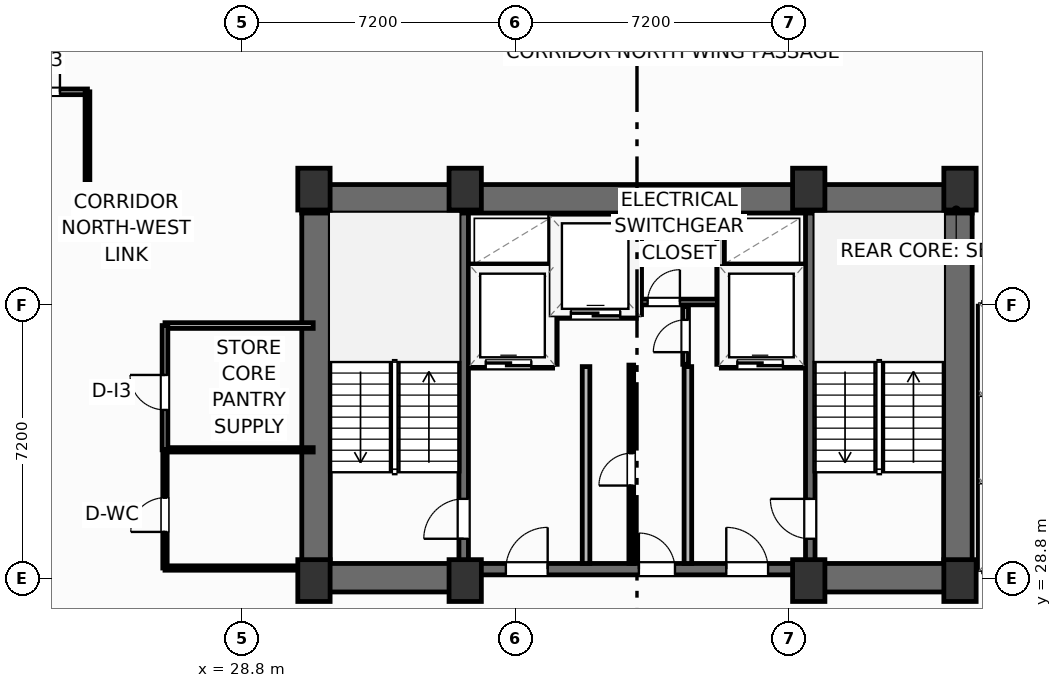
"""IFC4 building model, lengths in metres.
Left out: names, types, materials, properties, quantities, classifications, styles, units other than length and angle.
Written with IfcOpenShell. Run it as: python <this file> out.ifc"""

import sys

from ifc_helpers import new_model, si_unit, direction, frame, frame_2d, origin, origin_2d, place, context, subcontext, project, spatial, rectangle, extrude, element, fill, save


model = new_model("IFC4")
c1 = context("Model", 3, precision=1e-05, world=origin(), true_north=direction((0.0, 1.0)))
c2 = subcontext(c1, "Body", "Model", "MODEL_VIEW")
j1 = project(units=[si_unit("LENGTHUNIT", "METRE"), si_unit("PLANEANGLEUNIT", "RADIAN")], contexts=[c1])
p1 = place(None, origin())
s1 = spatial("IfcSite", under=j1, at=p1, CompositionType="ELEMENT")
p2 = place(p1, origin())
s2 = spatial("IfcBuilding", under=s1, at=p2, CompositionType="ELEMENT")
p3 = place(p2, frame((0.0, 0.0, 143.9)))
s3 = spatial("IfcBuildingStorey", under=s2, at=p3, CompositionType="ELEMENT", Elevation=143.9)
for number, where, z_axis, x_axis in (
    (1, (30.7, 28.75, 0.0), (0.0, 0.0, 1.0), (1.0, 0.0, 0.0)),
    (2, (34.68, 28.75, 0.0), (0.0, 0.0, 1.0), (1.0, 0.0, 0.0)),
    (3, (43.72, 28.75, 0.0), (0.0, 0.0, 1.0), (1.0, 0.0, 0.0)),
    (4, (47.7, 28.75, 0.0), (0.0, 0.0, 1.0), (1.0, 0.0, 0.0)),
    (5, (30.7, 39.05, 0.0), (0.0, 0.0, 1.0), (1.0, 0.0, 0.0)),
    (6, (34.68, 39.05, 0.0), (0.0, 0.0, 1.0), (1.0, 0.0, 0.0)),
    (7, (43.72, 39.05, 0.0), (0.0, 0.0, 1.0), (1.0, 0.0, 0.0)),
    (8, (47.7, 39.05, 0.0), (0.0, 0.0, 1.0), (1.0, 0.0, 0.0)),
):
    element("IfcColumn", number, at=place(p3, frame(where, z_axis=z_axis, x_axis=x_axis)), inside=s3, PredefinedType="COLUMN", context=c2, shape_type="SweptSolid", body=[
        extrude(rectangle(XDim=0.85, YDim=1.1, at=origin_2d()), origin(), (0.0, 0.0, 1.0), 3.7),
    ])
p4 = place(p3, frame((30.38, 38.795, 0.0), z_axis=(0.0, 0.0, 1.0), x_axis=(1.0, 0.0, 0.0)))
e9 = element("IfcWall", 9, at=p4, inside=s3, PredefinedType="SHEAR", context=c2, shape_type="SweptSolid", body=[
    extrude(rectangle(XDim=17.64, YDim=0.75, at=frame_2d((8.82, 0.0))), origin(), (0.0, 0.0, 1.0), 3.45),
])
for number, where, z_axis, x_axis in (
    (10, (30.755, 29.2, 0.0), (0.0, 0.0, 1.0), (0.0, 1.0, 0.0)),
    (11, (47.645, 29.2, 0.0), (0.0, 0.0, 1.0), (0.0, 1.0, 0.0)),
):
    element("IfcWall", number, at=place(p3, frame(where, z_axis=z_axis, x_axis=x_axis)), inside=s3, PredefinedType="SHEAR", context=c2, shape_type="SweptSolid", body=[
        extrude(rectangle(XDim=9.22, YDim=0.75, at=frame_2d((4.61, 0.0))), origin(), (0.0, 0.0, 1.0), 3.45),
    ])
p5 = place(p3, frame((30.38, 28.825, 0.0), z_axis=(0.0, 0.0, 1.0), x_axis=(1.0, 0.0, 0.0)))
e12 = element("IfcWall", 12, at=p5, inside=s3, PredefinedType="SHEAR", context=c2, shape_type="SweptSolid", body=[
    extrude(rectangle(XDim=4.42, YDim=0.75, at=frame_2d((2.21, 0.0))), origin(), (0.0, 0.0, 1.0), 3.45),
])
p6 = place(p3, frame((43.6, 28.825, 0.0), z_axis=(0.0, 0.0, 1.0), x_axis=(1.0, 0.0, 0.0)))
e13 = element("IfcWall", 13, at=p6, inside=s3, PredefinedType="SHEAR", context=c2, shape_type="SweptSolid", body=[
    extrude(rectangle(XDim=4.42, YDim=0.75, at=frame_2d((2.21, 0.0))), origin(), (0.0, 0.0, 1.0), 3.45),
])
p7 = place(p3, frame((34.8, 29.05, 0.0), z_axis=(0.0, 0.0, 1.0), x_axis=(1.0, 0.0, 0.0)))
e14 = element("IfcWall", 14, at=p7, inside=s3, PredefinedType="SHEAR", context=c2, shape_type="SweptSolid", body=[
    extrude(rectangle(XDim=8.8, YDim=0.3, at=frame_2d((4.4, 0.0))), origin(), (0.0, 0.0, 1.0), 3.45),
])
p8 = place(p7, frame((0.95, 0.0, 0.0)))
e15 = element("IfcOpeningElement", 15, at=p8, cuts=e14, PredefinedType="OPENING", context=c2, shape_type="SweptSolid", body=[
    extrude(rectangle(XDim=1.1, YDim=2.15, at=frame_2d((0.55, 1.075))), frame((0.0, 0.16, 0.0), z_axis=(0.0, -1.0, 0.0), x_axis=(1.0, 0.0, 0.0)), (0.0, 0.0, 1.0), 0.32),
])
p9 = place(p7, frame((6.75, 0.0, 0.0)))
e16 = element("IfcOpeningElement", 16, at=p9, cuts=e14, PredefinedType="OPENING", context=c2, shape_type="SweptSolid", body=[
    extrude(rectangle(XDim=1.1, YDim=2.15, at=frame_2d((0.55, 1.075))), frame((0.0, 0.16, 0.0), z_axis=(0.0, -1.0, 0.0), x_axis=(1.0, 0.0, 0.0)), (0.0, 0.0, 1.0), 0.32),
])
p10 = place(p7, frame((4.45, 0.0, 0.0)))
e17 = element("IfcOpeningElement", 17, at=p10, cuts=e14, PredefinedType="OPENING", context=c2, shape_type="SweptSolid", body=[
    extrude(rectangle(XDim=0.95, YDim=2.15, at=frame_2d((0.475, 1.075))), frame((0.0, 0.16, 0.0), z_axis=(0.0, -1.0, 0.0), x_axis=(1.0, 0.0, 0.0)), (0.0, 0.0, 1.0), 0.32),
])
p11 = place(p3, frame((34.64, 29.2, 0.0), z_axis=(0.0, 0.0, 1.0), x_axis=(0.0, 1.0, 0.0)))
e18 = element("IfcWall", 18, at=p11, inside=s3, PredefinedType="SHEAR", context=c2, shape_type="SweptSolid", body=[
    extrude(rectangle(XDim=9.22, YDim=0.25, at=frame_2d((4.61, 0.0))), origin(), (0.0, 0.0, 1.0), 3.45),
])
p12 = place(p11, frame((0.65, 0.0, 0.0)))
e19 = element("IfcOpeningElement", 19, at=p12, cuts=e18, PredefinedType="OPENING", context=c2, shape_type="SweptSolid", body=[
    extrude(rectangle(XDim=1.05, YDim=2.15, at=frame_2d((0.525, 1.075))), frame((0.0, 0.135, 0.0), z_axis=(0.0, -1.0, 0.0), x_axis=(1.0, 0.0, 0.0)), (0.0, 0.0, 1.0), 0.27),
])
p13 = place(p3, frame((43.76, 29.2, 0.0), z_axis=(0.0, 0.0, 1.0), x_axis=(0.0, 1.0, 0.0)))
e20 = element("IfcWall", 20, at=p13, inside=s3, PredefinedType="SHEAR", context=c2, shape_type="SweptSolid", body=[
    extrude(rectangle(XDim=9.22, YDim=0.25, at=frame_2d((4.61, 0.0))), origin(), (0.0, 0.0, 1.0), 3.45),
])
p14 = place(p13, frame((0.65, 0.0, 0.0)))
e21 = element("IfcOpeningElement", 21, at=p14, cuts=e20, PredefinedType="OPENING", context=c2, shape_type="SweptSolid", body=[
    extrude(rectangle(XDim=1.05, YDim=2.15, at=frame_2d((0.525, 1.075))), frame((0.0, 0.135, 0.0), z_axis=(0.0, -1.0, 0.0), x_axis=(1.0, 0.0, 0.0)), (0.0, 0.0, 1.0), 0.27),
])
p15 = place(p3, frame((5.0, 41.61, 0.0), z_axis=(0.0, 0.0, 1.0), x_axis=(1.0, 0.0, 0.0)))
e22 = element("IfcWall", 22, at=p15, inside=s3, PredefinedType="PARTITIONING", context=c2, shape_type="SweptSolid", body=[
    extrude(rectangle(XDim=19.74, YDim=0.15, at=frame_2d((9.87, 0.0))), origin(), (0.0, 0.0, 1.0), 3.45),
])
p16 = place(p15, frame((18.096, 0.0, 0.0)))
e23 = element("IfcOpeningElement", 23, at=p16, cuts=e22, PredefinedType="OPENING", context=c2, shape_type="SweptSolid", body=[
    extrude(rectangle(XDim=0.92, YDim=2.05, at=frame_2d((0.46, 1.025))), frame((0.0, 0.085, 0.0), z_axis=(0.0, -1.0, 0.0), x_axis=(1.0, 0.0, 0.0)), (0.0, 0.0, 1.0), 0.17),
])
p17 = place(p3, frame((24.74, 39.3, 0.0), z_axis=(0.0, 0.0, 1.0), x_axis=(0.0, 1.0, 0.0)))
e24 = element("IfcWall", 24, at=p17, inside=s3, PredefinedType="PARTITIONING", context=c2, shape_type="SweptSolid", body=[
    extrude(rectangle(XDim=2.31, YDim=0.125, at=frame_2d((1.155, 0.0))), origin(), (0.0, 0.0, 1.0), 3.45),
])
for number, where, z_axis, x_axis in (
    (25, (37.86, 29.2, 0.0), (0.0, 0.0, 1.0), (0.0, 1.0, 0.0)),
    (26, (40.54, 29.2, 0.0), (0.0, 0.0, 1.0), (0.0, 1.0, 0.0)),
):
    element("IfcWall", number, at=place(p3, frame(where, z_axis=z_axis, x_axis=x_axis)), inside=s3, PredefinedType="PARTITIONING", context=c2, shape_type="SweptSolid", body=[
        extrude(rectangle(XDim=5.18, YDim=0.2, at=frame_2d((2.59, 0.0))), origin(), (0.0, 0.0, 1.0), 3.45),
    ])
p18 = place(p3, frame((34.8, 34.44, 0.0), z_axis=(0.0, 0.0, 1.0), x_axis=(1.0, 0.0, 0.0)))
e27 = element("IfcWall", 27, at=p18, inside=s3, PredefinedType="PARTITIONING", context=c2, shape_type="SweptSolid", body=[
    extrude(rectangle(XDim=2.18, YDim=0.2, at=frame_2d((1.09, 0.0))), origin(), (0.0, 0.0, 1.0), 3.45),
])
p19 = place(p18, frame((0.42, 0.0, 0.0)))
e28 = element("IfcOpeningElement", 28, at=p19, cuts=e27, PredefinedType="OPENING", context=c2, shape_type="SweptSolid", body=[
    extrude(rectangle(XDim=1.2, YDim=2.2, at=frame_2d((0.6, 1.1))), frame((0.0, 0.11, 0.0), z_axis=(0.0, -1.0, 0.0), x_axis=(1.0, 0.0, 0.0)), (0.0, 0.0, 1.0), 0.22),
])
p20 = place(p3, frame((34.8, 36.98, 0.0), z_axis=(0.0, 0.0, 1.0), x_axis=(1.0, 0.0, 0.0)))
e29 = element("IfcWall", 29, at=p20, inside=s3, PredefinedType="PARTITIONING", context=c2, shape_type="SweptSolid", body=[
    extrude(rectangle(XDim=2.18, YDim=0.2, at=frame_2d((1.09, 0.0))), origin(), (0.0, 0.0, 1.0), 3.45),
])
p21 = place(p3, frame((37.0, 34.44, 0.0), z_axis=(0.0, 0.0, 1.0), x_axis=(0.0, 1.0, 0.0)))
e30 = element("IfcWall", 30, at=p21, inside=s3, PredefinedType="PARTITIONING", context=c2, shape_type="SweptSolid", body=[
    extrude(rectangle(XDim=3.9, YDim=0.2, at=frame_2d((1.95, 0.0))), origin(), (0.0, 0.0, 1.0), 3.45),
])
p22 = place(p3, frame((41.42, 34.44, 0.0), z_axis=(0.0, 0.0, 1.0), x_axis=(1.0, 0.0, 0.0)))
e31 = element("IfcWall", 31, at=p22, inside=s3, PredefinedType="PARTITIONING", context=c2, shape_type="SweptSolid", body=[
    extrude(rectangle(XDim=2.18, YDim=0.2, at=frame_2d((1.09, 0.0))), origin(), (0.0, 0.0, 1.0), 3.45),
])
p23 = place(p22, frame((0.42, 0.0, 0.0)))
e32 = element("IfcOpeningElement", 32, at=p23, cuts=e31, PredefinedType="OPENING", context=c2, shape_type="SweptSolid", body=[
    extrude(rectangle(XDim=1.2, YDim=2.2, at=frame_2d((0.6, 1.1))), frame((0.0, 0.11, 0.0), z_axis=(0.0, -1.0, 0.0), x_axis=(1.0, 0.0, 0.0)), (0.0, 0.0, 1.0), 0.22),
])
p24 = place(p3, frame((41.42, 36.98, 0.0), z_axis=(0.0, 0.0, 1.0), x_axis=(1.0, 0.0, 0.0)))
e33 = element("IfcWall", 33, at=p24, inside=s3, PredefinedType="PARTITIONING", context=c2, shape_type="SweptSolid", body=[
    extrude(rectangle(XDim=2.18, YDim=0.2, at=frame_2d((1.09, 0.0))), origin(), (0.0, 0.0, 1.0), 3.45),
])
p25 = place(p3, frame((41.4, 34.44, 0.0), z_axis=(0.0, 0.0, 1.0), x_axis=(0.0, 1.0, 0.0)))
e34 = element("IfcWall", 34, at=p25, inside=s3, PredefinedType="PARTITIONING", context=c2, shape_type="SweptSolid", body=[
    extrude(rectangle(XDim=3.9, YDim=0.2, at=frame_2d((1.95, 0.0))), origin(), (0.0, 0.0, 1.0), 3.45),
])
p26 = place(p3, frame((37.06, 35.75, 0.0), z_axis=(0.0, 0.0, 1.0), x_axis=(1.0, 0.0, 0.0)))
e35 = element("IfcWall", 35, at=p26, inside=s3, PredefinedType="PARTITIONING", context=c2, shape_type="SweptSolid", body=[
    extrude(rectangle(XDim=2.12, YDim=0.2, at=frame_2d((1.06, 0.0))), origin(), (0.0, 0.0, 1.0), 3.45),
])
p27 = place(p26, frame((0.4, 0.0, 0.0)))
e36 = element("IfcOpeningElement", 36, at=p27, cuts=e35, PredefinedType="OPENING", context=c2, shape_type="SweptSolid", body=[
    extrude(rectangle(XDim=1.3, YDim=2.2, at=frame_2d((0.65, 1.1))), frame((0.0, 0.11, 0.0), z_axis=(0.0, -1.0, 0.0), x_axis=(1.0, 0.0, 0.0)), (0.0, 0.0, 1.0), 0.22),
])
p28 = place(p3, frame((39.22, 35.75, 0.0), z_axis=(0.0, 0.0, 1.0), x_axis=(0.0, 1.0, 0.0)))
e37 = element("IfcWall", 37, at=p28, inside=s3, PredefinedType="PARTITIONING", context=c2, shape_type="SweptSolid", body=[
    extrude(rectangle(XDim=2.59, YDim=0.2, at=frame_2d((1.295, 0.0))), origin(), (0.0, 0.0, 1.0), 3.45),
])
p29 = place(p3, frame((39.3, 36.08, 0.0), z_axis=(0.0, 0.0, 1.0), x_axis=(1.0, 0.0, 0.0)))
e38 = element("IfcWall", 38, at=p29, inside=s3, PredefinedType="PARTITIONING", context=c2, shape_type="SweptSolid", body=[
    extrude(rectangle(XDim=2.02, YDim=0.15, at=frame_2d((1.01, 0.0))), origin(), (0.0, 0.0, 1.0), 3.45),
])
p30 = place(p29, frame((0.18, 0.0, 0.0)))
e39 = element("IfcOpeningElement", 39, at=p30, cuts=e38, PredefinedType="OPENING", context=c2, shape_type="SweptSolid", body=[
    extrude(rectangle(XDim=0.85, YDim=2.05, at=frame_2d((0.425, 1.025))), frame((0.0, 0.085, 0.0), z_axis=(0.0, -1.0, 0.0), x_axis=(1.0, 0.0, 0.0)), (0.0, 0.0, 1.0), 0.17),
])
p31 = place(p3, frame((40.48, 34.44, 0.0), z_axis=(0.0, 0.0, 1.0), x_axis=(0.0, 1.0, 0.0)))
e40 = element("IfcWall", 40, at=p31, inside=s3, PredefinedType="PARTITIONING", context=c2, shape_type="SweptSolid", body=[
    extrude(rectangle(XDim=1.52, YDim=0.15, at=frame_2d((0.76, 0.0))), origin(), (0.0, 0.0, 1.0), 3.45),
])
p32 = place(p31, frame((0.32, 0.0, 0.0)))
e41 = element("IfcOpeningElement", 41, at=p32, cuts=e40, PredefinedType="OPENING", context=c2, shape_type="SweptSolid", body=[
    extrude(rectangle(XDim=0.85, YDim=2.05, at=frame_2d((0.425, 1.025))), frame((0.0, 0.085, 0.0), z_axis=(0.0, -1.0, 0.0), x_axis=(1.0, 0.0, 0.0)), (0.0, 0.0, 1.0), 0.17),
])
p33 = place(p3, frame((39.05, 29.2, 0.0), z_axis=(0.0, 0.0, 1.0), x_axis=(0.0, 1.0, 0.0)))
e42 = element("IfcWall", 42, at=p33, inside=s3, PredefinedType="PARTITIONING", context=c2, shape_type="SweptSolid", body=[
    extrude(rectangle(XDim=5.22, YDim=0.125, at=frame_2d((2.61, 0.0))), origin(), (0.0, 0.0, 1.0), 3.45),
])
p34 = place(p33, frame((2.05, 0.0, 0.0)))
e43 = element("IfcOpeningElement", 43, at=p34, cuts=e42, PredefinedType="OPENING", context=c2, shape_type="SweptSolid", body=[
    extrude(rectangle(XDim=0.85, YDim=2.05, at=frame_2d((0.425, 1.025))), frame((0.0, 0.073, 0.0), z_axis=(0.0, -1.0, 0.0), x_axis=(1.0, 0.0, 0.0)), (0.0, 0.0, 1.0), 0.145),
])
p35 = place(p3, frame((26.8, 32.19, 0.0), z_axis=(0.0, 0.0, 1.0), x_axis=(1.0, 0.0, 0.0)))
e44 = element("IfcWall", 44, at=p35, inside=s3, PredefinedType="PARTITIONING", context=c2, shape_type="SweptSolid", body=[
    extrude(rectangle(XDim=3.88, YDim=0.115, at=frame_2d((1.94, 0.0))), origin(), (0.0, 0.0, 1.0), 3.45),
])
p36 = place(p3, frame((26.78, 29.08, 0.0), z_axis=(0.0, 0.0, 1.0), x_axis=(1.0, 0.0, 0.0)))
e45 = element("IfcWall", 45, at=p36, inside=s3, PredefinedType="PARTITIONING", context=c2, shape_type="SweptSolid", body=[
    extrude(rectangle(XDim=3.6, YDim=0.115, at=frame_2d((1.8, 0.0))), origin(), (0.0, 0.0, 1.0), 3.45),
])
p37 = place(p3, frame((26.78, 35.46, 0.0), z_axis=(0.0, 0.0, 1.0), x_axis=(1.0, 0.0, 0.0)))
e46 = element("IfcWall", 46, at=p37, inside=s3, PredefinedType="PARTITIONING", context=c2, shape_type="SweptSolid", body=[
    extrude(rectangle(XDim=3.9, YDim=0.15, at=frame_2d((1.95, 0.0))), origin(), (0.0, 0.0, 1.0), 3.45),
])
p38 = place(p3, frame((26.78, 29.08, 0.0), z_axis=(0.0, 0.0, 1.0), x_axis=(0.0, 1.0, 0.0)))
e47 = element("IfcWall", 47, at=p38, inside=s3, PredefinedType="PARTITIONING", context=c2, shape_type="SweptSolid", body=[
    extrude(rectangle(XDim=3.11, YDim=0.115, at=frame_2d((1.555, 0.0))), origin(), (0.0, 0.0, 1.0), 3.45),
])
p39 = place(p38, frame((0.95, 0.0, 0.0)))
e48 = element("IfcOpeningElement", 48, at=p39, cuts=e47, PredefinedType="OPENING", context=c2, shape_type="SweptSolid", body=[
    extrude(rectangle(XDim=0.9, YDim=2.05, at=frame_2d((0.45, 1.025))), frame((0.0, 0.067, 0.0), z_axis=(0.0, -1.0, 0.0), x_axis=(1.0, 0.0, 0.0)), (0.0, 0.0, 1.0), 0.135),
])
p40 = place(p3, frame((26.78, 32.19, 0.0), z_axis=(0.0, 0.0, 1.0), x_axis=(0.0, 1.0, 0.0)))
e49 = element("IfcWall", 49, at=p40, inside=s3, PredefinedType="PARTITIONING", context=c2, shape_type="SweptSolid", body=[
    extrude(rectangle(XDim=3.27, YDim=0.15, at=frame_2d((1.635, 0.0))), origin(), (0.0, 0.0, 1.0), 3.45),
])
p41 = place(p40, frame((1.05, 0.0, 0.0)))
e50 = element("IfcOpeningElement", 50, at=p41, cuts=e49, PredefinedType="OPENING", context=c2, shape_type="SweptSolid", body=[
    extrude(rectangle(XDim=0.92, YDim=2.05, at=frame_2d((0.46, 1.025))), frame((0.0, 0.085, 0.0), z_axis=(0.0, -1.0, 0.0), x_axis=(1.0, 0.0, 0.0)), (0.0, 0.0, 1.0), 0.17),
])
p42 = place(p3, frame((48.28, 29.08, 0.0), z_axis=(0.0, 0.0, 1.0), x_axis=(0.0, 1.0, 0.0)))
e51 = element("IfcWall", 51, at=p42, inside=s3, PredefinedType="PARTITIONING", context=c2, shape_type="SweptSolid", body=[
    extrude(rectangle(XDim=6.89, YDim=0.2, at=frame_2d((3.445, 0.0))), origin(), (0.0, 0.0, 1.0), 3.45),
])
p43 = place(p16, origin())
e52 = element("IfcDoor", 52, at=p43, inside=s3, OperationType="SINGLE_SWING_RIGHT", PredefinedType="DOOR", context=c2, shape_type="SweptSolid", body=[
    extrude(rectangle(XDim=0.92, YDim=2.05, at=frame_2d((0.46, 1.025))), frame((0.0, 0.025, 0.0), z_axis=(0.0, -1.0, 0.0), x_axis=(1.0, 0.0, 0.0)), (0.0, 0.0, 1.0), 0.05),
])
fill(e23, e52)
p44 = place(p12, origin())
e53 = element("IfcDoor", 53, at=p44, inside=s3, OperationType="SINGLE_SWING_LEFT", PredefinedType="DOOR", context=c2, shape_type="SweptSolid", body=[
    extrude(rectangle(XDim=1.05, YDim=2.15, at=frame_2d((0.525, 1.075))), frame((0.0, 0.025, 0.0), z_axis=(0.0, -1.0, 0.0), x_axis=(1.0, 0.0, 0.0)), (0.0, 0.0, 1.0), 0.05),
])
fill(e19, e53)
p45 = place(p14, origin())
e54 = element("IfcDoor", 54, at=p45, inside=s3, OperationType="SINGLE_SWING_RIGHT", PredefinedType="DOOR", context=c2, shape_type="SweptSolid", body=[
    extrude(rectangle(XDim=1.05, YDim=2.15, at=frame_2d((0.525, 1.075))), frame((0.0, 0.025, 0.0), z_axis=(0.0, -1.0, 0.0), x_axis=(1.0, 0.0, 0.0)), (0.0, 0.0, 1.0), 0.05),
])
fill(e21, e54)
p46 = place(p8, origin())
e55 = element("IfcDoor", 55, at=p46, inside=s3, OperationType="SINGLE_SWING_RIGHT", PredefinedType="DOOR", context=c2, shape_type="SweptSolid", body=[
    extrude(rectangle(XDim=1.1, YDim=2.15, at=frame_2d((0.55, 1.075))), frame((0.0, 0.025, 0.0), z_axis=(0.0, -1.0, 0.0), x_axis=(1.0, 0.0, 0.0)), (0.0, 0.0, 1.0), 0.05),
])
fill(e15, e55)
p47 = place(p9, origin())
e56 = element("IfcDoor", 56, at=p47, inside=s3, OperationType="SINGLE_SWING_LEFT", PredefinedType="DOOR", context=c2, shape_type="SweptSolid", body=[
    extrude(rectangle(XDim=1.1, YDim=2.15, at=frame_2d((0.55, 1.075))), frame((0.0, 0.025, 0.0), z_axis=(0.0, -1.0, 0.0), x_axis=(1.0, 0.0, 0.0)), (0.0, 0.0, 1.0), 0.05),
])
fill(e16, e56)
p48 = place(p19, origin())
e57 = element("IfcDoor", 57, at=p48, inside=s3, OperationType="SLIDING_TO_LEFT", PredefinedType="DOOR", context=c2, shape_type="SweptSolid", body=[
    extrude(rectangle(XDim=1.2, YDim=2.2, at=frame_2d((0.6, 1.1))), frame((0.0, 0.025, 0.0), z_axis=(0.0, -1.0, 0.0), x_axis=(1.0, 0.0, 0.0)), (0.0, 0.0, 1.0), 0.05),
])
fill(e28, e57)
p49 = place(p23, origin())
e58 = element("IfcDoor", 58, at=p49, inside=s3, OperationType="SLIDING_TO_LEFT", PredefinedType="DOOR", context=c2, shape_type="SweptSolid", body=[
    extrude(rectangle(XDim=1.2, YDim=2.2, at=frame_2d((0.6, 1.1))), frame((0.0, 0.025, 0.0), z_axis=(0.0, -1.0, 0.0), x_axis=(1.0, 0.0, 0.0)), (0.0, 0.0, 1.0), 0.05),
])
fill(e32, e58)
p50 = place(p27, origin())
e59 = element("IfcDoor", 59, at=p50, inside=s3, OperationType="SLIDING_TO_LEFT", PredefinedType="DOOR", context=c2, shape_type="SweptSolid", body=[
    extrude(rectangle(XDim=1.3, YDim=2.2, at=frame_2d((0.65, 1.1))), frame((0.0, 0.025, 0.0), z_axis=(0.0, -1.0, 0.0), x_axis=(1.0, 0.0, 0.0)), (0.0, 0.0, 1.0), 0.05),
])
fill(e36, e59)
p51 = place(p30, origin())
e60 = element("IfcDoor", 60, at=p51, inside=s3, OperationType="SINGLE_SWING_RIGHT", PredefinedType="DOOR", context=c2, shape_type="SweptSolid", body=[
    extrude(rectangle(XDim=0.85, YDim=2.05, at=frame_2d((0.425, 1.025))), frame((0.0, 0.025, 0.0), z_axis=(0.0, -1.0, 0.0), x_axis=(1.0, 0.0, 0.0)), (0.0, 0.0, 1.0), 0.05),
])
fill(e39, e60)
p52 = place(p32, origin())
e61 = element("IfcDoor", 61, at=p52, inside=s3, OperationType="SINGLE_SWING_LEFT", PredefinedType="DOOR", context=c2, shape_type="SweptSolid", body=[
    extrude(rectangle(XDim=0.85, YDim=2.05, at=frame_2d((0.425, 1.025))), frame((0.0, 0.025, 0.0), z_axis=(0.0, -1.0, 0.0), x_axis=(1.0, 0.0, 0.0)), (0.0, 0.0, 1.0), 0.05),
])
fill(e41, e61)
p53 = place(p34, origin())
e62 = element("IfcDoor", 62, at=p53, inside=s3, OperationType="SINGLE_SWING_LEFT", PredefinedType="DOOR", context=c2, shape_type="SweptSolid", body=[
    extrude(rectangle(XDim=0.85, YDim=2.05, at=frame_2d((0.425, 1.025))), frame((0.0, 0.025, 0.0), z_axis=(0.0, -1.0, 0.0), x_axis=(1.0, 0.0, 0.0)), (0.0, 0.0, 1.0), 0.05),
])
fill(e43, e62)
p54 = place(p10, origin())
e63 = element("IfcDoor", 63, at=p54, inside=s3, OperationType="SINGLE_SWING_LEFT", PredefinedType="DOOR", context=c2, shape_type="SweptSolid", body=[
    extrude(rectangle(XDim=0.95, YDim=2.15, at=frame_2d((0.475, 1.075))), frame((0.0, 0.025, 0.0), z_axis=(0.0, -1.0, 0.0), x_axis=(1.0, 0.0, 0.0)), (0.0, 0.0, 1.0), 0.05),
])
fill(e17, e63)
p55 = place(p39, origin())
e64 = element("IfcDoor", 64, at=p55, inside=s3, OperationType="SINGLE_SWING_LEFT", PredefinedType="DOOR", context=c2, shape_type="SweptSolid", body=[
    extrude(rectangle(XDim=0.9, YDim=2.05, at=frame_2d((0.45, 1.025))), frame((0.0, 0.025, 0.0), z_axis=(0.0, -1.0, 0.0), x_axis=(1.0, 0.0, 0.0)), (0.0, 0.0, 1.0), 0.05),
])
fill(e48, e64)
p56 = place(p41, origin())
e65 = element("IfcDoor", 65, at=p56, inside=s3, OperationType="SINGLE_SWING_RIGHT", PredefinedType="DOOR", context=c2, shape_type="SweptSolid", body=[
    extrude(rectangle(XDim=0.92, YDim=2.05, at=frame_2d((0.46, 1.025))), frame((0.0, 0.025, 0.0), z_axis=(0.0, -1.0, 0.0), x_axis=(1.0, 0.0, 0.0)), (0.0, 0.0, 1.0), 0.05),
])
fill(e50, e65)
save(model, sys.argv[1])
